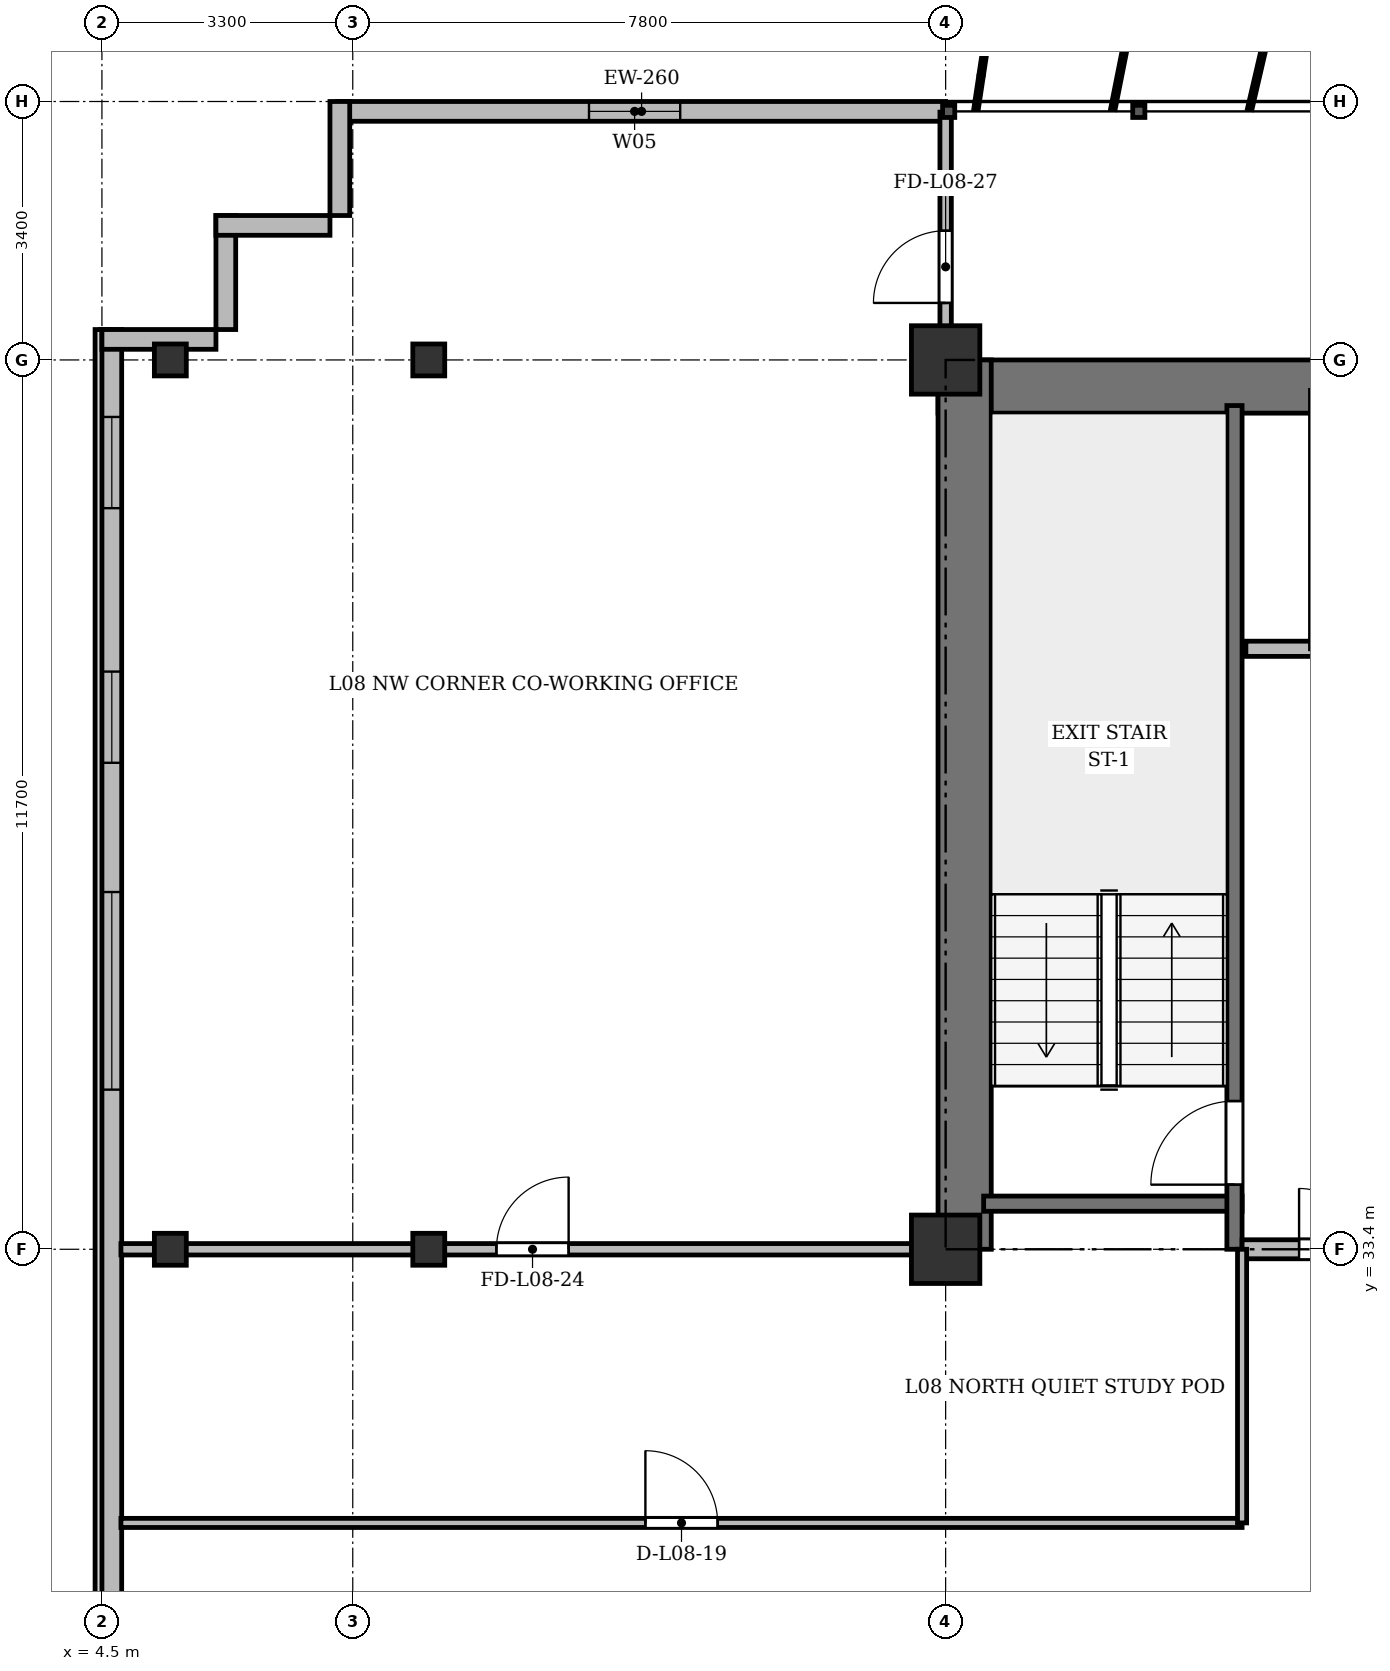
"""IFC4 building model, lengths in metres.
Left out: names, types, materials, properties, quantities, classifications, styles, units other than length and angle.
Written with IfcOpenShell. Run it as: python <this file> out.ifc"""

import sys

from ifc_helpers import new_model, si_unit, direction, frame, frame_2d, origin, origin_2d, place, context, subcontext, project, spatial, rectangle, i_section, extrude, source, transform, mapped, element, fill, save


model = new_model("IFC4")
c1 = context("Model", 3, precision=1e-05, world=origin(), true_north=direction((0.0, 1.0)))
c2 = subcontext(c1, "Body", "Model", "MODEL_VIEW")
j1 = project(units=[si_unit("LENGTHUNIT", "METRE"), si_unit("PLANEANGLEUNIT", "RADIAN")], contexts=[c1])
p1 = place(None, origin())
s1 = spatial("IfcSite", under=j1, at=p1, CompositionType="ELEMENT")
p2 = place(p1, origin())
s2 = spatial("IfcBuilding", under=s1, at=p2, CompositionType="ELEMENT")
p3 = place(p2, frame((0.0, 0.0, 34.3)))
s3 = spatial("IfcBuildingStorey", under=s2, at=p3, CompositionType="ELEMENT", Elevation=34.3)
m1 = source(origin(), c2, "Body", "SweptSolid", [
    extrude(i_section(OverallWidth=0.42, OverallDepth=0.42, WebThickness=0.026, FlangeThickness=0.04, at=origin_2d()), origin(), (0.0, 0.0, 1.0), 3.6),
])
for number, where, z_axis, x_axis in (
    (1, (5.4, 33.4, 0.0), (0.0, 0.0, 1.0), (1.0, 0.0, 0.0)),
    (2, (5.4, 45.1, 0.0), (0.0, 0.0, 1.0), (1.0, 0.0, 0.0)),
    (3, (8.8, 33.4, 0.0), (0.0, 0.0, 1.0), (1.0, 0.0, 0.0)),
    (4, (8.8, 45.1, 0.0), (0.0, 0.0, 1.0), (1.0, 0.0, 0.0)),
):
    element("IfcColumn", number, at=place(p3, frame(where, z_axis=z_axis, x_axis=x_axis)), inside=s3, PredefinedType="COLUMN", context=c2, shape_type="MappedRepresentation", body=[
        mapped(m1, transform((0.0, 0.0, 0.0), x_axis=(1.0, 0.0, 0.0), y_axis=(0.0, 1.0, 0.0), z_axis=(0.0, 0.0, 1.0), scale=1.0)),
    ])
m2 = source(origin(), c2, "Body", "SweptSolid", [
    extrude(rectangle(XDim=0.9, YDim=0.9, at=origin_2d()), origin(), (0.0, 0.0, 1.0), 3.6),
])
for number, where, z_axis, x_axis in (
    (5, (15.6, 33.4, 0.0), (0.0, 0.0, 1.0), (1.0, 0.0, 0.0)),
    (6, (15.6, 45.1, 0.0), (0.0, 0.0, 1.0), (1.0, 0.0, 0.0)),
):
    element("IfcColumn", number, at=place(p3, frame(where, z_axis=z_axis, x_axis=x_axis)), inside=s3, PredefinedType="COLUMN", context=c2, shape_type="MappedRepresentation", body=[
        mapped(m2, transform((0.0, 0.0, 0.0), x_axis=(1.0, 0.0, 0.0), y_axis=(0.0, 1.0, 0.0), z_axis=(0.0, 0.0, 1.0), scale=1.0)),
    ])
p4 = place(p3, frame((7.6, 48.37, 0.0), z_axis=(0.0, 0.0, 1.0), x_axis=(1.0, 0.0, 0.0)))
e7 = element("IfcWall", 7, at=p4, inside=s3, PredefinedType="SOLIDWALL", context=c2, shape_type="SweptSolid", body=[
    extrude(rectangle(XDim=8.0, YDim=0.26, at=frame_2d((4.0, 0.0))), origin(), (0.0, 0.0, 1.0), 3.34),
])
p5 = place(p4, frame((3.308, 0.0, 0.9)))
e8 = element("IfcOpeningElement", 8, at=p5, cuts=e7, PredefinedType="OPENING", context=c2, shape_type="SweptSolid", body=[
    extrude(rectangle(XDim=1.2, YDim=1.65, at=frame_2d((0.6, 0.825))), frame((0.0, 0.14, 0.0), z_axis=(0.0, -1.0, 0.0), x_axis=(1.0, 0.0, 0.0)), (0.0, 0.0, 1.0), 0.28),
])
p6 = place(p3, frame((4.63, 5.9, 0.0), z_axis=(0.0, 0.0, 1.0), x_axis=(0.0, 1.0, 0.0)))
e9 = element("IfcWall", 9, at=p6, inside=s3, PredefinedType="SOLIDWALL", context=c2, shape_type="SweptSolid", body=[
    extrude(rectangle(XDim=39.6, YDim=0.26, at=frame_2d((19.8, 0.0))), origin(), (0.0, 0.0, 1.0), 3.34),
])
p7 = place(p6, frame((1.45, 0.0, 0.92)))
e10 = element("IfcOpeningElement", 10, at=p7, cuts=e9, PredefinedType="OPENING", context=c2, shape_type="SweptSolid", body=[
    extrude(rectangle(XDim=1.2, YDim=1.65, at=frame_2d((0.6, 0.825))), frame((0.0, 0.14, 0.0), z_axis=(0.0, -1.0, 0.0), x_axis=(1.0, 0.0, 0.0)), (0.0, 0.0, 1.0), 0.28),
])
p8 = place(p6, frame((4.2, 0.0, 0.92)))
e11 = element("IfcOpeningElement", 11, at=p8, cuts=e9, PredefinedType="OPENING", context=c2, shape_type="SweptSolid", body=[
    extrude(rectangle(XDim=2.6, YDim=1.9, at=frame_2d((1.3, 0.95))), frame((0.0, 0.14, 0.0), z_axis=(0.0, -1.0, 0.0), x_axis=(1.0, 0.0, 0.0)), (0.0, 0.0, 1.0), 0.28),
])
p9 = place(p6, frame((15.6, 0.0, 0.92)))
e12 = element("IfcOpeningElement", 12, at=p9, cuts=e9, PredefinedType="OPENING", context=c2, shape_type="SweptSolid", body=[
    extrude(rectangle(XDim=2.6, YDim=1.9, at=frame_2d((1.3, 0.95))), frame((0.0, 0.14, 0.0), z_axis=(0.0, -1.0, 0.0), x_axis=(1.0, 0.0, 0.0)), (0.0, 0.0, 1.0), 0.28),
])
p10 = place(p6, frame((29.6, 0.0, 0.92)))
e13 = element("IfcOpeningElement", 13, at=p10, cuts=e9, PredefinedType="OPENING", context=c2, shape_type="SweptSolid", body=[
    extrude(rectangle(XDim=2.6, YDim=1.9, at=frame_2d((1.3, 0.95))), frame((0.0, 0.14, 0.0), z_axis=(0.0, -1.0, 0.0), x_axis=(1.0, 0.0, 0.0)), (0.0, 0.0, 1.0), 0.28),
])
p11 = place(p6, frame((33.9, 0.0, 0.92)))
e14 = element("IfcOpeningElement", 14, at=p11, cuts=e9, PredefinedType="OPENING", context=c2, shape_type="SweptSolid", body=[
    extrude(rectangle(XDim=1.2, YDim=1.65, at=frame_2d((0.6, 0.825))), frame((0.0, 0.14, 0.0), z_axis=(0.0, -1.0, 0.0), x_axis=(1.0, 0.0, 0.0)), (0.0, 0.0, 1.0), 0.28),
])
p12 = place(p6, frame((37.25, 0.0, 0.92)))
e15 = element("IfcOpeningElement", 15, at=p12, cuts=e9, PredefinedType="OPENING", context=c2, shape_type="SweptSolid", body=[
    extrude(rectangle(XDim=1.2, YDim=1.65, at=frame_2d((0.6, 0.825))), frame((0.0, 0.14, 0.0), z_axis=(0.0, -1.0, 0.0), x_axis=(1.0, 0.0, 0.0)), (0.0, 0.0, 1.0), 0.28),
])
p13 = place(p3, frame((4.5, 45.37, 0.0), z_axis=(0.0, 0.0, 1.0), x_axis=(1.0, 0.0, 0.0)))
e16 = element("IfcWall", 16, at=p13, inside=s3, PredefinedType="SOLIDWALL", context=c2, shape_type="SweptSolid", body=[
    extrude(rectangle(XDim=1.5, YDim=0.26, at=frame_2d((0.75, 0.0))), origin(), (0.0, 0.0, 1.0), 2.69),
])
for number, where, z_axis, x_axis in (
    (17, (6.13, 45.5, 0.0), (0.0, 0.0, 1.0), (0.0, 1.0, 0.0)),
    (18, (6.0, 46.87, 0.0), (0.0, 0.0, 1.0), (1.0, 0.0, 0.0)),
    (19, (7.63, 47.0, 0.0), (0.0, 0.0, 1.0), (0.0, 1.0, 0.0)),
):
    element("IfcWall", number, at=place(p3, frame(where, z_axis=z_axis, x_axis=x_axis)), inside=s3, PredefinedType="SOLIDWALL", context=c2, shape_type="SweptSolid", body=[
        extrude(rectangle(XDim=1.5, YDim=0.26, at=frame_2d((0.75, 0.0))), origin(), (0.0, 0.0, 1.0), 3.34),
    ])
p14 = place(p3, frame((15.5, 44.75, 0.0), z_axis=(0.0, 0.0, 1.0), x_axis=(1.0, 0.0, 0.0)))
e20 = element("IfcWall", 20, at=p14, inside=s3, PredefinedType="SHEAR", context=c2, shape_type="SweptSolid", body=[
    extrude(rectangle(XDim=43.4, YDim=0.7, at=frame_2d((21.7, 0.0))), origin(), (0.0, 0.0, 1.0), 3.34),
])
p15 = place(p3, frame((15.85, 33.4, 0.0), z_axis=(0.0, 0.0, 1.0), x_axis=(0.0, 1.0, 0.0)))
e21 = element("IfcWall", 21, at=p15, inside=s3, PredefinedType="SHEAR", context=c2, shape_type="SweptSolid", body=[
    extrude(rectangle(XDim=11.7, YDim=0.7, at=frame_2d((5.85, 0.0))), origin(), (0.0, 0.0, 1.0), 3.34),
])
p16 = place(p3, frame((16.1, 34.0, 0.0), z_axis=(0.0, 0.0, 1.0), x_axis=(1.0, 0.0, 0.0)))
e22 = element("IfcWall", 22, at=p16, inside=s3, PredefinedType="SHEAR", context=c2, shape_type="SweptSolid", body=[
    extrude(rectangle(XDim=3.4, YDim=0.2, at=frame_2d((1.7, 0.0))), origin(), (0.0, 0.0, 1.0), 3.34),
])
p17 = place(p3, frame((19.4, 33.4, 0.0), z_axis=(0.0, 0.0, 1.0), x_axis=(0.0, 1.0, 0.0)))
e23 = element("IfcWall", 23, at=p17, inside=s3, PredefinedType="SHEAR", context=c2, shape_type="SweptSolid", body=[
    extrude(rectangle(XDim=11.1, YDim=0.2, at=frame_2d((5.55, 0.0))), origin(), (0.0, 0.0, 1.0), 3.34),
])
p18 = place(p17, frame((0.85, 0.0, 0.0)))
e24 = element("IfcOpeningElement", 24, at=p18, cuts=e23, PredefinedType="OPENING", context=c2, shape_type="SweptSolid", body=[
    extrude(rectangle(XDim=1.1, YDim=2.15, at=frame_2d((0.55, 1.075))), frame((0.0, 0.11, 0.0), z_axis=(0.0, -1.0, 0.0), x_axis=(1.0, 0.0, 0.0)), (0.0, 0.0, 1.0), 0.22),
])
p19 = place(p3, frame((19.55, 41.3, 0.0), z_axis=(0.0, 0.0, 1.0), x_axis=(1.0, 0.0, 0.0)))
e25 = element("IfcWall", 25, at=p19, inside=s3, PredefinedType="SOLIDWALL", context=c2, shape_type="SweptSolid", body=[
    extrude(rectangle(XDim=6.75, YDim=0.2, at=frame_2d((3.375, 0.0))), origin(), (0.0, 0.0, 1.0), 3.34),
])
p20 = place(p19, frame((1.7, 0.0, 0.0)))
e26 = element("IfcOpeningElement", 26, at=p20, cuts=e25, PredefinedType="OPENING", context=c2, shape_type="SweptSolid", body=[
    extrude(rectangle(XDim=1.1, YDim=2.15, at=frame_2d((0.55, 1.075))), frame((0.0, 0.11, 0.0), z_axis=(0.0, -1.0, 0.0), x_axis=(1.0, 0.0, 0.0)), (0.0, 0.0, 1.0), 0.22),
])
p21 = place(p19, frame((4.4, 0.0, 0.0)))
e27 = element("IfcOpeningElement", 27, at=p21, cuts=e25, PredefinedType="OPENING", context=c2, shape_type="SweptSolid", body=[
    extrude(rectangle(XDim=1.1, YDim=2.15, at=frame_2d((0.55, 1.075))), frame((0.0, 0.11, 0.0), z_axis=(0.0, -1.0, 0.0), x_axis=(1.0, 0.0, 0.0)), (0.0, 0.0, 1.0), 0.22),
])
p22 = place(p3, frame((19.5, 33.4, 0.0), z_axis=(0.0, 0.0, 1.0), x_axis=(1.0, 0.0, 0.0)))
e28 = element("IfcWall", 28, at=p22, inside=s3, PredefinedType="PARTITIONING", context=c2, shape_type="SweptSolid", body=[
    extrude(rectangle(XDim=6.8, YDim=0.25, at=frame_2d((3.4, 0.0))), origin(), (0.0, 0.0, 1.0), 2.69),
])
p23 = place(p22, frame((0.75, 0.0, 0.0)))
e29 = element("IfcOpeningElement", 29, at=p23, cuts=e28, PredefinedType="OPENING", context=c2, shape_type="SweptSolid", body=[
    extrude(rectangle(XDim=1.6, YDim=2.2, at=frame_2d((0.8, 1.1))), frame((0.0, 0.135, 0.0), z_axis=(0.0, -1.0, 0.0), x_axis=(1.0, 0.0, 0.0)), (0.0, 0.0, 1.0), 0.27),
])
p24 = place(p3, frame((4.75, 29.8, 0.0), z_axis=(0.0, 0.0, 1.0), x_axis=(1.0, 0.0, 0.0)))
e30 = element("IfcWall", 30, at=p24, inside=s3, PredefinedType="PARTITIONING", context=c2, shape_type="SweptSolid", body=[
    extrude(rectangle(XDim=14.75, YDim=0.12, at=frame_2d((7.375, 0.0))), origin(), (0.0, 0.0, 1.0), 2.752),
])
p25 = place(p24, frame((6.9, 0.0, 0.0)))
e31 = element("IfcOpeningElement", 31, at=p25, cuts=e30, PredefinedType="OPENING", context=c2, shape_type="SweptSolid", body=[
    extrude(rectangle(XDim=0.95, YDim=2.15, at=frame_2d((0.475, 1.075))), frame((0.0, 0.07, 0.0), z_axis=(0.0, -1.0, 0.0), x_axis=(1.0, 0.0, 0.0)), (0.0, 0.0, 1.0), 0.14),
])
p26 = place(p3, frame((19.5, 29.8, 0.0), z_axis=(0.0, 0.0, 1.0), x_axis=(0.0, 1.0, 0.0)))
e32 = element("IfcWall", 32, at=p26, inside=s3, PredefinedType="PARTITIONING", context=c2, shape_type="SweptSolid", body=[
    extrude(rectangle(XDim=3.6, YDim=0.12, at=frame_2d((1.8, 0.0))), origin(), (0.0, 0.0, 1.0), 2.69),
])
p27 = place(p3, frame((4.75, 33.4, 0.0), z_axis=(0.0, 0.0, 1.0), x_axis=(1.0, 0.0, 0.0)))
e33 = element("IfcWall", 33, at=p27, inside=s3, PredefinedType="PARTITIONING", context=c2, shape_type="SweptSolid", body=[
    extrude(rectangle(XDim=10.85, YDim=0.15, at=frame_2d((5.425, 0.0))), origin(), (0.0, 0.0, 1.0), 2.69),
])
p28 = place(p27, frame((4.94, 0.0, 0.0)))
e34 = element("IfcOpeningElement", 34, at=p28, cuts=e33, PredefinedType="OPENING", context=c2, shape_type="SweptSolid", body=[
    extrude(rectangle(XDim=0.95, YDim=2.15, at=frame_2d((0.475, 1.075))), frame((0.0, 0.085, 0.0), z_axis=(0.0, -1.0, 0.0), x_axis=(1.0, 0.0, 0.0)), (0.0, 0.0, 1.0), 0.17),
])
p29 = place(p3, frame((15.6, 44.75, 0.0), z_axis=(0.0, 0.0, 1.0), x_axis=(0.0, 1.0, 0.0)))
e35 = element("IfcWall", 35, at=p29, inside=s3, PredefinedType="PARTITIONING", context=c2, shape_type="SweptSolid", body=[
    extrude(rectangle(XDim=3.61, YDim=0.15, at=frame_2d((1.805, 0.0))), origin(), (0.0, 0.0, 1.0), 2.752),
])
p30 = place(p29, frame((1.1, 0.0, 0.0)))
e36 = element("IfcOpeningElement", 36, at=p30, cuts=e35, PredefinedType="OPENING", context=c2, shape_type="SweptSolid", body=[
    extrude(rectangle(XDim=0.95, YDim=2.15, at=frame_2d((0.475, 1.075))), frame((0.0, 0.085, 0.0), z_axis=(0.0, -1.0, 0.0), x_axis=(1.0, 0.0, 0.0)), (0.0, 0.0, 1.0), 0.17),
])
m3 = source(origin(), c2, "Body", "SweptSolid", [
    extrude(rectangle(XDim=1.2, YDim=1.65, at=frame_2d((0.6, 0.825))), frame((0.0, 0.03, 0.0), z_axis=(0.0, -1.0, 0.0), x_axis=(1.0, 0.0, 0.0)), (0.0, 0.0, 1.0), 0.06),
])
p31 = place(p5, origin())
e37 = element("IfcWindow", 37, at=p31, inside=s3, PartitioningType="SINGLE_PANEL", PredefinedType="WINDOW", context=c2, shape_type="MappedRepresentation", body=[
    mapped(m3, transform((0.0, 0.0, 0.0), x_axis=(1.0, 0.0, 0.0), y_axis=(0.0, 1.0, 0.0), z_axis=(0.0, 0.0, 1.0), scale=1.0)),
])
fill(e8, e37)
m4 = source(origin(), c2, "Body", "SweptSolid", [
    extrude(rectangle(XDim=2.6, YDim=1.9, at=frame_2d((1.3, 0.95))), frame((0.0, 0.03, 0.0), z_axis=(0.0, -1.0, 0.0), x_axis=(1.0, 0.0, 0.0)), (0.0, 0.0, 1.0), 0.06),
])
p32 = place(p10, origin())
e38 = element("IfcWindow", 38, at=p32, inside=s3, PartitioningType="SINGLE_PANEL", PredefinedType="WINDOW", context=c2, shape_type="MappedRepresentation", body=[
    mapped(m4, transform((0.0, 0.0, 0.0), x_axis=(1.0, 0.0, 0.0), y_axis=(0.0, 1.0, 0.0), z_axis=(0.0, 0.0, 1.0), scale=1.0)),
])
fill(e13, e38)
p33 = place(p11, origin())
e39 = element("IfcWindow", 39, at=p33, inside=s3, PartitioningType="SINGLE_PANEL", PredefinedType="WINDOW", context=c2, shape_type="MappedRepresentation", body=[
    mapped(m3, transform((0.0, 0.0, 0.0), x_axis=(1.0, 0.0, 0.0), y_axis=(0.0, 1.0, 0.0), z_axis=(0.0, 0.0, 1.0), scale=1.0)),
])
fill(e14, e39)
p34 = place(p12, origin())
e40 = element("IfcWindow", 40, at=p34, inside=s3, PartitioningType="SINGLE_PANEL", PredefinedType="WINDOW", context=c2, shape_type="MappedRepresentation", body=[
    mapped(m3, transform((0.0, 0.0, 0.0), x_axis=(1.0, 0.0, 0.0), y_axis=(0.0, 1.0, 0.0), z_axis=(0.0, 0.0, 1.0), scale=1.0)),
])
fill(e15, e40)
m5 = source(origin(), c2, "Body", "SweptSolid", [
    extrude(rectangle(XDim=1.1, YDim=2.15, at=frame_2d((0.55, 1.075))), frame((0.0, 0.025, 0.0), z_axis=(0.0, -1.0, 0.0), x_axis=(1.0, 0.0, 0.0)), (0.0, 0.0, 1.0), 0.05),
])
p35 = place(p18, origin())
e41 = element("IfcDoor", 41, at=p35, inside=s3, OperationType="SINGLE_SWING_LEFT", PredefinedType="DOOR", context=c2, shape_type="MappedRepresentation", body=[
    mapped(m5, transform((0.0, 0.0, 0.0), x_axis=(1.0, 0.0, 0.0), y_axis=(0.0, 1.0, 0.0), z_axis=(0.0, 0.0, 1.0), scale=1.0)),
])
fill(e24, e41)
m6 = source(origin(), c2, "Body", "SweptSolid", [
    extrude(rectangle(XDim=1.6, YDim=2.2, at=frame_2d((0.8, 1.1))), frame((0.0, 0.025, 0.0), z_axis=(0.0, -1.0, 0.0), x_axis=(1.0, 0.0, 0.0)), (0.0, 0.0, 1.0), 0.05),
])
p36 = place(p23, origin())
e42 = element("IfcDoor", 42, at=p36, inside=s3, OperationType="DOUBLE_DOOR_SINGLE_SWING", PredefinedType="DOOR", context=c2, shape_type="MappedRepresentation", body=[
    mapped(m6, transform((0.0, 0.0, 0.0), x_axis=(1.0, 0.0, 0.0), y_axis=(0.0, 1.0, 0.0), z_axis=(0.0, 0.0, 1.0), scale=1.0)),
])
fill(e29, e42)
m7 = source(origin(), c2, "Body", "SweptSolid", [
    extrude(rectangle(XDim=0.95, YDim=2.15, at=frame_2d((0.475, 1.075))), frame((0.0, 0.025, 0.0), z_axis=(0.0, -1.0, 0.0), x_axis=(1.0, 0.0, 0.0)), (0.0, 0.0, 1.0), 0.05),
])
p37 = place(p25, origin())
e43 = element("IfcDoor", 43, at=p37, inside=s3, OperationType="SINGLE_SWING_LEFT", PredefinedType="DOOR", context=c2, shape_type="MappedRepresentation", body=[
    mapped(m7, transform((0.0, 0.0, 0.0), x_axis=(1.0, 0.0, 0.0), y_axis=(0.0, 1.0, 0.0), z_axis=(0.0, 0.0, 1.0), scale=1.0)),
])
fill(e31, e43)
p38 = place(p28, origin())
e44 = element("IfcDoor", 44, at=p38, inside=s3, OperationType="SINGLE_SWING_RIGHT", PredefinedType="DOOR", context=c2, shape_type="MappedRepresentation", body=[
    mapped(m7, transform((0.0, 0.0, 0.0), x_axis=(1.0, 0.0, 0.0), y_axis=(0.0, 1.0, 0.0), z_axis=(0.0, 0.0, 1.0), scale=1.0)),
])
fill(e34, e44)
p39 = place(p30, origin())
e45 = element("IfcDoor", 45, at=p39, inside=s3, OperationType="SINGLE_SWING_LEFT", PredefinedType="DOOR", context=c2, shape_type="MappedRepresentation", body=[
    mapped(m7, transform((0.0, 0.0, 0.0), x_axis=(1.0, 0.0, 0.0), y_axis=(0.0, 1.0, 0.0), z_axis=(0.0, 0.0, 1.0), scale=1.0)),
])
fill(e36, e45)
save(model, sys.argv[1])
